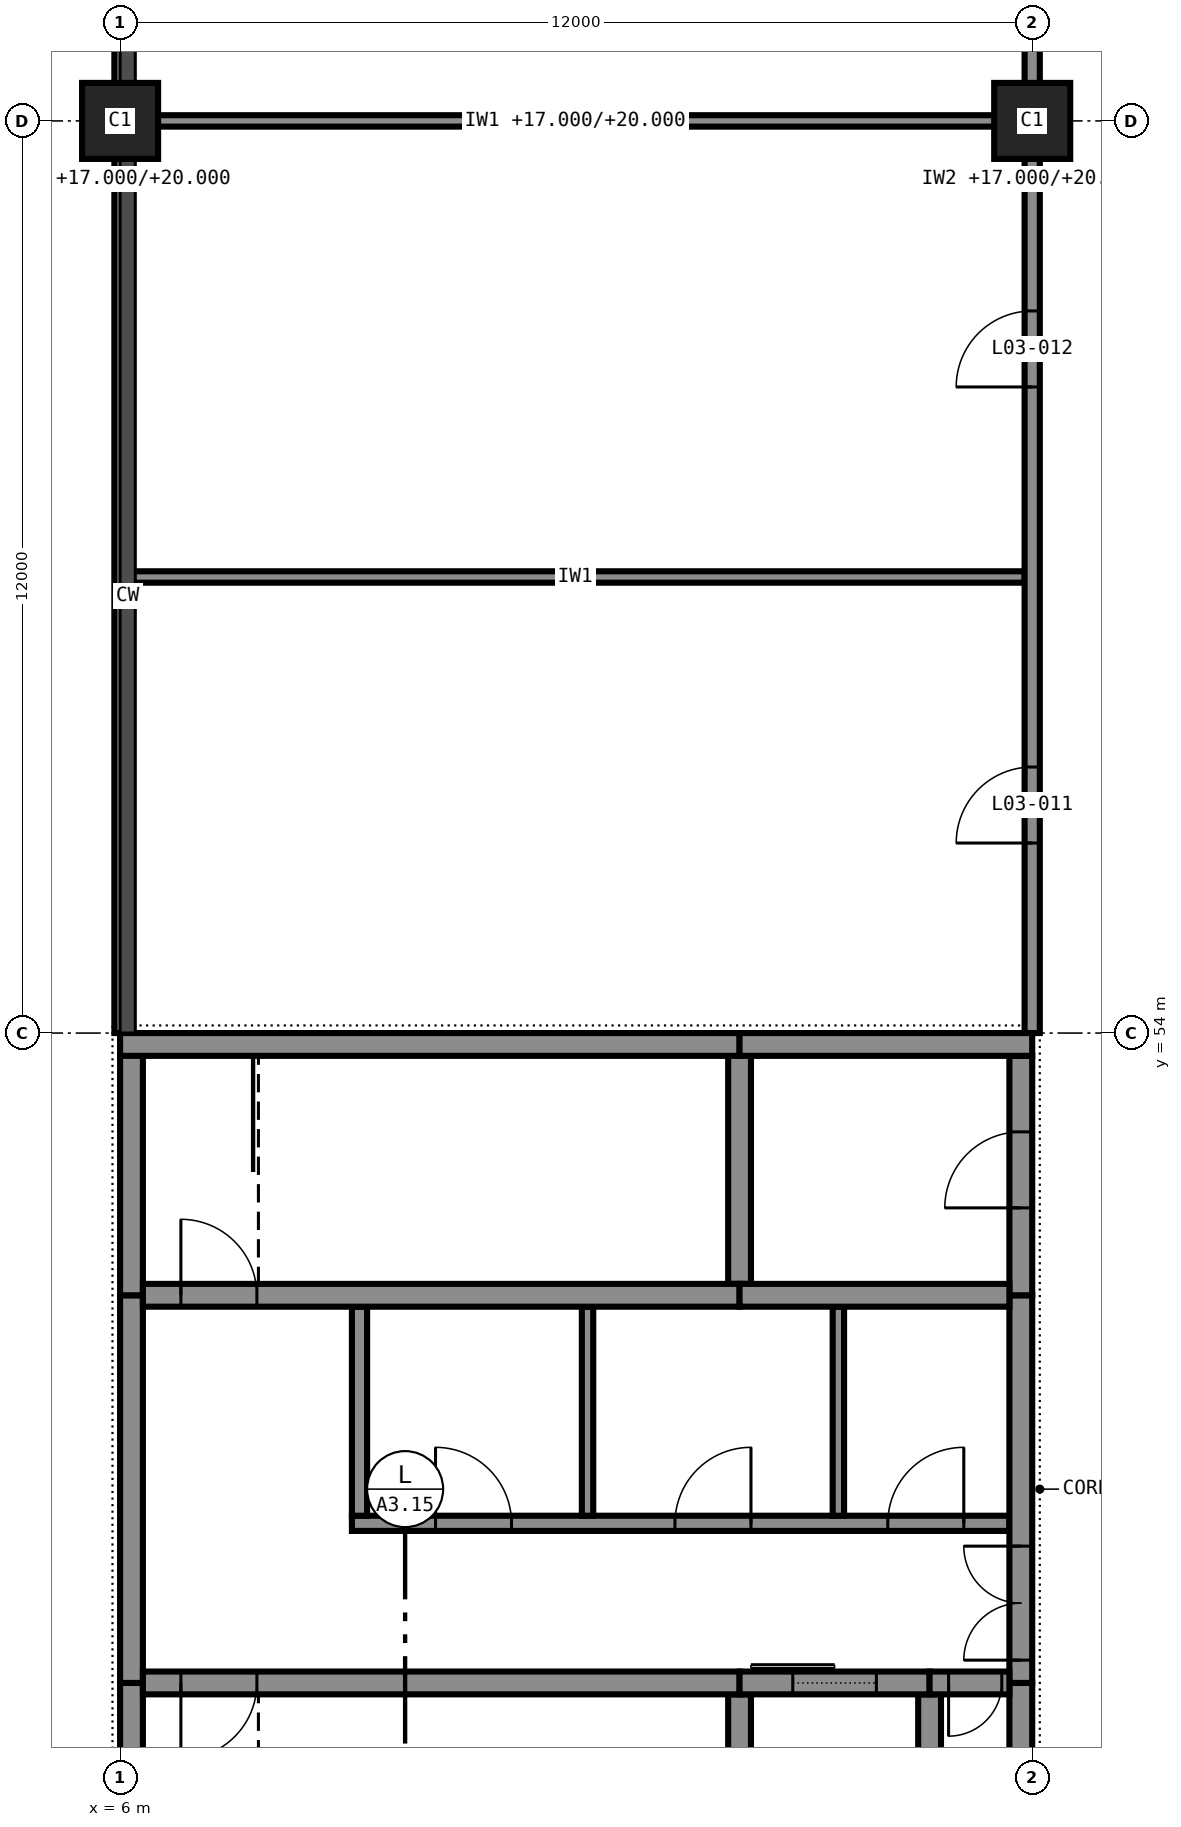
"""IFC4 building model, lengths in metres.
Left out: names, types, materials, properties, quantities, classifications, styles, units other than length and angle.
Written with IfcOpenShell. Run it as: python <this file> out.ifc"""

import sys

from ifc_helpers import new_model, si_unit, direction, frame, frame_2d, origin, origin_2d, place, context, subcontext, project, spatial, rectangle, extrude, element, fill, save


model = new_model("IFC4")
c1 = context("Model", 3, precision=1e-05, world=origin(), true_north=direction((0.0, 1.0)))
c2 = subcontext(c1, "Body", "Model", "MODEL_VIEW")
j1 = project(units=[si_unit("LENGTHUNIT", "METRE"), si_unit("PLANEANGLEUNIT", "RADIAN")], contexts=[c1])
p1 = place(None, origin())
s1 = spatial("IfcSite", under=j1, at=p1, CompositionType="ELEMENT")
p2 = place(p1, origin())
s2 = spatial("IfcBuilding", under=s1, at=p2, CompositionType="ELEMENT")
p3 = place(p2, frame((0.0, 0.0, 17.0)))
s3 = spatial("IfcBuildingStorey", under=s2, at=p3, CompositionType="ELEMENT", Elevation=17.0)
for number, where, z_axis, x_axis in (
    (1, (6.0, 66.0, 0.0), (0.0, 0.0, 1.0), (1.0, 0.0, 0.0)),
    (2, (18.0, 66.0, 0.0), (0.0, 0.0, 1.0), (1.0, 0.0, 0.0)),
):
    element("IfcColumn", number, at=place(p3, frame(where, z_axis=z_axis, x_axis=x_axis)), inside=s3, PredefinedType="COLUMN", context=c2, shape_type="SweptSolid", body=[
        extrude(rectangle(XDim=1.0, YDim=1.0, at=origin_2d()), origin(), (0.0, 0.0, 1.0), 4.0),
    ])
p4 = place(p3, frame((6.0, 53.85, 0.0), z_axis=(0.0, 0.0, 1.0), x_axis=(1.0, 0.0, 0.0)))
e3 = element("IfcWall", 3, at=p4, inside=s3, PredefinedType="SHEAR", context=c2, shape_type="SweptSolid", body=[
    extrude(rectangle(XDim=8.15, YDim=0.3, at=frame_2d((4.075, 0.0))), origin(), (0.0, 0.0, 1.0), 3.8),
])
p5 = place(p3, frame((14.15, 53.85, 0.0), z_axis=(0.0, 0.0, 1.0), x_axis=(1.0, 0.0, 0.0)))
e4 = element("IfcWall", 4, at=p5, inside=s3, PredefinedType="SHEAR", context=c2, shape_type="SweptSolid", body=[
    extrude(rectangle(XDim=3.85, YDim=0.3, at=frame_2d((1.925, 0.0))), origin(), (0.0, 0.0, 1.0), 3.8),
])
p6 = place(p3, frame((6.3, 45.45, 0.0), z_axis=(0.0, 0.0, 1.0), x_axis=(1.0, 0.0, 0.0)))
e5 = element("IfcWall", 5, at=p6, inside=s3, PredefinedType="SHEAR", context=c2, shape_type="SweptSolid", body=[
    extrude(rectangle(XDim=7.85, YDim=0.3, at=frame_2d((3.925, 0.0))), origin(), (0.0, 0.0, 1.0), 3.8),
])
p7 = place(p6, frame((0.5, 0.0, 0.0)))
e6 = element("IfcOpeningElement", 6, at=p7, cuts=e5, PredefinedType="OPENING", context=c2, shape_type="SweptSolid", body=[
    extrude(rectangle(XDim=1.0, YDim=2.1, at=frame_2d((0.5, 1.05))), frame((0.0, 0.16, 0.0), z_axis=(0.0, -1.0, 0.0), x_axis=(1.0, 0.0, 0.0)), (0.0, 0.0, 1.0), 0.32),
])
p8 = place(p3, frame((14.15, 45.45, 0.0), z_axis=(0.0, 0.0, 1.0), x_axis=(1.0, 0.0, 0.0)))
e7 = element("IfcWall", 7, at=p8, inside=s3, PredefinedType="SHEAR", context=c2, shape_type="SweptSolid", body=[
    extrude(rectangle(XDim=2.5, YDim=0.3, at=frame_2d((1.25, 0.0))), origin(), (0.0, 0.0, 1.0), 3.8),
])
p9 = place(p8, frame((0.7, 0.0, 0.0)))
e8 = element("IfcOpeningElement", 8, at=p9, cuts=e7, PredefinedType="OPENING", context=c2, shape_type="SweptSolid", body=[
    extrude(rectangle(XDim=1.1, YDim=2.1, at=frame_2d((0.55, 1.05))), frame((0.0, 0.16, 0.0), z_axis=(0.0, -1.0, 0.0), x_axis=(1.0, 0.0, 0.0)), (0.0, 0.0, 1.0), 0.32),
])
p10 = place(p3, frame((16.65, 45.45, 0.0), z_axis=(0.0, 0.0, 1.0), x_axis=(1.0, 0.0, 0.0)))
e9 = element("IfcWall", 9, at=p10, inside=s3, PredefinedType="SHEAR", context=c2, shape_type="SweptSolid", body=[
    extrude(rectangle(XDim=1.05, YDim=0.3, at=frame_2d((0.525, 0.0))), origin(), (0.0, 0.0, 1.0), 3.8),
])
p11 = place(p10, frame((0.25, 0.0, 0.0)))
e10 = element("IfcOpeningElement", 10, at=p11, cuts=e9, PredefinedType="OPENING", context=c2, shape_type="SweptSolid", body=[
    extrude(rectangle(XDim=0.7, YDim=2.1, at=frame_2d((0.35, 1.05))), frame((0.0, 0.16, 0.0), z_axis=(0.0, -1.0, 0.0), x_axis=(1.0, 0.0, 0.0)), (0.0, 0.0, 1.0), 0.32),
])
p12 = place(p3, frame((6.3, 50.55, 0.0), z_axis=(0.0, 0.0, 1.0), x_axis=(1.0, 0.0, 0.0)))
e11 = element("IfcWall", 11, at=p12, inside=s3, PredefinedType="SHEAR", context=c2, shape_type="SweptSolid", body=[
    extrude(rectangle(XDim=7.85, YDim=0.3, at=frame_2d((3.925, 0.0))), origin(), (0.0, 0.0, 1.0), 3.8),
])
p13 = place(p12, frame((0.5, 0.0, 0.0)))
e12 = element("IfcOpeningElement", 12, at=p13, cuts=e11, PredefinedType="OPENING", context=c2, shape_type="SweptSolid", body=[
    extrude(rectangle(XDim=1.0, YDim=2.1, at=frame_2d((0.5, 1.05))), frame((0.0, 0.16, 0.0), z_axis=(0.0, -1.0, 0.0), x_axis=(1.0, 0.0, 0.0)), (0.0, 0.0, 1.0), 0.32),
])
p14 = place(p3, frame((14.15, 50.55, 0.0), z_axis=(0.0, 0.0, 1.0), x_axis=(1.0, 0.0, 0.0)))
e13 = element("IfcWall", 13, at=p14, inside=s3, PredefinedType="SHEAR", context=c2, shape_type="SweptSolid", body=[
    extrude(rectangle(XDim=3.55, YDim=0.3, at=frame_2d((1.775, 0.0))), origin(), (0.0, 0.0, 1.0), 3.8),
])
p15 = place(p3, frame((6.15, 42.3, 0.0), z_axis=(0.0, 0.0, 1.0), x_axis=(0.0, 1.0, 0.0)))
e14 = element("IfcWall", 14, at=p15, inside=s3, PredefinedType="SHEAR", context=c2, shape_type="SweptSolid", body=[
    extrude(rectangle(XDim=3.15, YDim=0.3, at=frame_2d((1.575, 0.0))), origin(), (0.0, 0.0, 1.0), 3.8),
])
p16 = place(p3, frame((6.15, 45.45, 0.0), z_axis=(0.0, 0.0, 1.0), x_axis=(0.0, 1.0, 0.0)))
e15 = element("IfcWall", 15, at=p16, inside=s3, PredefinedType="SHEAR", context=c2, shape_type="SweptSolid", body=[
    extrude(rectangle(XDim=5.1, YDim=0.3, at=frame_2d((2.55, 0.0))), origin(), (0.0, 0.0, 1.0), 3.8),
])
p17 = place(p3, frame((6.15, 50.55, 0.0), z_axis=(0.0, 0.0, 1.0), x_axis=(0.0, 1.0, 0.0)))
e16 = element("IfcWall", 16, at=p17, inside=s3, PredefinedType="SHEAR", context=c2, shape_type="SweptSolid", body=[
    extrude(rectangle(XDim=3.45, YDim=0.3, at=frame_2d((1.725, 0.0))), origin(), (0.0, 0.0, 1.0), 3.8),
])
p18 = place(p3, frame((17.85, 42.3, 0.0), z_axis=(0.0, 0.0, 1.0), x_axis=(0.0, 1.0, 0.0)))
e17 = element("IfcWall", 17, at=p18, inside=s3, PredefinedType="SHEAR", context=c2, shape_type="SweptSolid", body=[
    extrude(rectangle(XDim=3.15, YDim=0.3, at=frame_2d((1.575, 0.0))), origin(), (0.0, 0.0, 1.0), 3.8),
])
p19 = place(p3, frame((17.85, 45.45, 0.0), z_axis=(0.0, 0.0, 1.0), x_axis=(0.0, 1.0, 0.0)))
e18 = element("IfcWall", 18, at=p19, inside=s3, PredefinedType="SHEAR", context=c2, shape_type="SweptSolid", body=[
    extrude(rectangle(XDim=5.1, YDim=0.3, at=frame_2d((2.55, 0.0))), origin(), (0.0, 0.0, 1.0), 3.8),
])
p20 = place(p19, frame((0.3, 0.0, 0.0)))
e19 = element("IfcOpeningElement", 19, at=p20, cuts=e18, PredefinedType="OPENING", context=c2, shape_type="SweptSolid", body=[
    extrude(rectangle(XDim=1.5, YDim=2.1, at=frame_2d((0.75, 1.05))), frame((0.0, 0.16, 0.0), z_axis=(0.0, -1.0, 0.0), x_axis=(1.0, 0.0, 0.0)), (0.0, 0.0, 1.0), 0.32),
])
p21 = place(p3, frame((17.85, 50.55, 0.0), z_axis=(0.0, 0.0, 1.0), x_axis=(0.0, 1.0, 0.0)))
e20 = element("IfcWall", 20, at=p21, inside=s3, PredefinedType="SHEAR", context=c2, shape_type="SweptSolid", body=[
    extrude(rectangle(XDim=3.15, YDim=0.3, at=frame_2d((1.575, 0.0))), origin(), (0.0, 0.0, 1.0), 3.8),
])
p22 = place(p21, frame((1.15, 0.0, 0.0)))
e21 = element("IfcOpeningElement", 21, at=p22, cuts=e20, PredefinedType="OPENING", context=c2, shape_type="SweptSolid", body=[
    extrude(rectangle(XDim=1.0, YDim=2.1, at=frame_2d((0.5, 1.05))), frame((0.0, 0.16, 0.0), z_axis=(0.0, -1.0, 0.0), x_axis=(1.0, 0.0, 0.0)), (0.0, 0.0, 1.0), 0.32),
])
p23 = place(p3, frame((14.15, 42.3, 0.0), z_axis=(0.0, 0.0, 1.0), x_axis=(0.0, 1.0, 0.0)))
e22 = element("IfcWall", 22, at=p23, inside=s3, PredefinedType="SHEAR", context=c2, shape_type="SweptSolid", body=[
    extrude(rectangle(XDim=3.0, YDim=0.3, at=frame_2d((1.5, 0.0))), origin(), (0.0, 0.0, 1.0), 3.8),
])
p24 = place(p3, frame((14.15, 50.7, 0.0), z_axis=(0.0, 0.0, 1.0), x_axis=(0.0, 1.0, 0.0)))
e23 = element("IfcWall", 23, at=p24, inside=s3, PredefinedType="SHEAR", context=c2, shape_type="SweptSolid", body=[
    extrude(rectangle(XDim=3.3, YDim=0.3, at=frame_2d((1.65, 0.0))), origin(), (0.0, 0.0, 1.0), 3.8),
])
p25 = place(p3, frame((16.65, 42.3, 0.0), z_axis=(0.0, 0.0, 1.0), x_axis=(0.0, 1.0, 0.0)))
e24 = element("IfcWall", 24, at=p25, inside=s3, PredefinedType="SHEAR", context=c2, shape_type="SweptSolid", body=[
    extrude(rectangle(XDim=3.0, YDim=0.3, at=frame_2d((1.5, 0.0))), origin(), (0.0, 0.0, 1.0), 3.8),
])
p26 = place(p3, frame((9.05, 47.55, 0.0), z_axis=(0.0, 0.0, 1.0), x_axis=(1.0, 0.0, 0.0)))
e25 = element("IfcWall", 25, at=p26, inside=s3, PredefinedType="PARTITIONING", context=c2, shape_type="SweptSolid", body=[
    extrude(rectangle(XDim=8.65, YDim=0.2, at=frame_2d((4.325, 0.0))), origin(), (0.0, 0.0, 1.0), 3.8),
])
p27 = place(p26, frame((1.1, 0.0, 0.0)))
e26 = element("IfcOpeningElement", 26, at=p27, cuts=e25, PredefinedType="OPENING", context=c2, shape_type="SweptSolid", body=[
    extrude(rectangle(XDim=1.0, YDim=2.1, at=frame_2d((0.5, 1.05))), frame((0.0, 0.11, 0.0), z_axis=(0.0, -1.0, 0.0), x_axis=(1.0, 0.0, 0.0)), (0.0, 0.0, 1.0), 0.22),
])
p28 = place(p26, frame((4.25, 0.0, 0.0)))
e27 = element("IfcOpeningElement", 27, at=p28, cuts=e25, PredefinedType="OPENING", context=c2, shape_type="SweptSolid", body=[
    extrude(rectangle(XDim=1.0, YDim=2.1, at=frame_2d((0.5, 1.05))), frame((0.0, 0.11, 0.0), z_axis=(0.0, -1.0, 0.0), x_axis=(1.0, 0.0, 0.0)), (0.0, 0.0, 1.0), 0.22),
])
p29 = place(p26, frame((7.05, 0.0, 0.0)))
e28 = element("IfcOpeningElement", 28, at=p29, cuts=e25, PredefinedType="OPENING", context=c2, shape_type="SweptSolid", body=[
    extrude(rectangle(XDim=1.0, YDim=2.1, at=frame_2d((0.5, 1.05))), frame((0.0, 0.11, 0.0), z_axis=(0.0, -1.0, 0.0), x_axis=(1.0, 0.0, 0.0)), (0.0, 0.0, 1.0), 0.22),
])
p30 = place(p3, frame((6.075, 60.0, 0.0), z_axis=(0.0, 0.0, 1.0), x_axis=(1.0, 0.0, 0.0)))
e29 = element("IfcWall", 29, at=p30, inside=s3, PredefinedType="PARTITIONING", context=c2, shape_type="SweptSolid", body=[
    extrude(rectangle(XDim=11.825, YDim=0.15, at=frame_2d((5.913, 0.0))), origin(), (0.0, 0.0, 1.0), 3.8),
])
p31 = place(p3, frame((6.075, 66.0, 0.0), z_axis=(0.0, 0.0, 1.0), x_axis=(1.0, 0.0, 0.0)))
e30 = element("IfcWall", 30, at=p31, inside=s3, PredefinedType="PARTITIONING", context=c2, shape_type="SweptSolid", body=[
    extrude(rectangle(XDim=11.825, YDim=0.15, at=frame_2d((5.913, 0.0))), origin(), (0.0, 0.0, 1.0), 3.0),
])
p32 = place(p3, frame((6.0, 54.0, 0.0), z_axis=(0.0, 0.0, 1.0), x_axis=(0.0, 1.0, 0.0)))
e31 = element("IfcWall", 31, at=p32, inside=s3, PredefinedType="PARTITIONING", context=c2, shape_type="SweptSolid", body=[
    extrude(rectangle(XDim=36.0, YDim=0.15, at=frame_2d((18.0, 0.0))), origin(), (0.0, 0.0, 1.0), 3.0),
])
p33 = place(p3, frame((9.15, 47.65, 0.0), z_axis=(0.0, 0.0, 1.0), x_axis=(0.0, 1.0, 0.0)))
e32 = element("IfcWall", 32, at=p33, inside=s3, PredefinedType="PARTITIONING", context=c2, shape_type="SweptSolid", body=[
    extrude(rectangle(XDim=2.75, YDim=0.2, at=frame_2d((1.375, 0.0))), origin(), (0.0, 0.0, 1.0), 3.8),
])
for number, where, z_axis, x_axis in (
    (33, (12.15, 47.65, 0.0), (0.0, 0.0, 1.0), (0.0, 1.0, 0.0)),
    (34, (15.45, 47.65, 0.0), (0.0, 0.0, 1.0), (0.0, 1.0, 0.0)),
):
    element("IfcWall", number, at=place(p3, frame(where, z_axis=z_axis, x_axis=x_axis)), inside=s3, PredefinedType="PARTITIONING", context=c2, shape_type="SweptSolid", body=[
        extrude(rectangle(XDim=2.75, YDim=0.15, at=frame_2d((1.375, 0.0))), origin(), (0.0, 0.0, 1.0), 3.8),
    ])
p34 = place(p3, frame((18.0, 54.0, 0.0), z_axis=(0.0, 0.0, 1.0), x_axis=(0.0, 1.0, 0.0)))
e35 = element("IfcWall", 35, at=p34, inside=s3, PredefinedType="PARTITIONING", context=c2, shape_type="SweptSolid", body=[
    extrude(rectangle(XDim=36.0, YDim=0.2, at=frame_2d((18.0, 0.0))), origin(), (0.0, 0.0, 1.0), 3.0),
])
p35 = place(p34, frame((2.5, 0.0, 0.0)))
e36 = element("IfcOpeningElement", 36, at=p35, cuts=e35, PredefinedType="OPENING", context=c2, shape_type="SweptSolid", body=[
    extrude(rectangle(XDim=1.0, YDim=2.1, at=frame_2d((0.5, 1.05))), frame((0.0, 0.11, 0.0), z_axis=(0.0, -1.0, 0.0), x_axis=(1.0, 0.0, 0.0)), (0.0, 0.0, 1.0), 0.22),
])
p36 = place(p34, frame((8.5, 0.0, 0.0)))
e37 = element("IfcOpeningElement", 37, at=p36, cuts=e35, PredefinedType="OPENING", context=c2, shape_type="SweptSolid", body=[
    extrude(rectangle(XDim=1.0, YDim=2.1, at=frame_2d((0.5, 1.05))), frame((0.0, 0.11, 0.0), z_axis=(0.0, -1.0, 0.0), x_axis=(1.0, 0.0, 0.0)), (0.0, 0.0, 1.0), 0.22),
])
p37 = place(p34, frame((14.5, 0.0, 0.0)))
e38 = element("IfcOpeningElement", 38, at=p37, cuts=e35, PredefinedType="OPENING", context=c2, shape_type="SweptSolid", body=[
    extrude(rectangle(XDim=1.0, YDim=2.1, at=frame_2d((0.5, 1.05))), frame((0.0, 0.11, 0.0), z_axis=(0.0, -1.0, 0.0), x_axis=(1.0, 0.0, 0.0)), (0.0, 0.0, 1.0), 0.22),
])
p38 = place(p34, frame((20.5, 0.0, 0.0)))
e39 = element("IfcOpeningElement", 39, at=p38, cuts=e35, PredefinedType="OPENING", context=c2, shape_type="SweptSolid", body=[
    extrude(rectangle(XDim=1.0, YDim=2.1, at=frame_2d((0.5, 1.05))), frame((0.0, 0.11, 0.0), z_axis=(0.0, -1.0, 0.0), x_axis=(1.0, 0.0, 0.0)), (0.0, 0.0, 1.0), 0.22),
])
p39 = place(p34, frame((26.5, 0.0, 0.0)))
e40 = element("IfcOpeningElement", 40, at=p39, cuts=e35, PredefinedType="OPENING", context=c2, shape_type="SweptSolid", body=[
    extrude(rectangle(XDim=1.0, YDim=2.1, at=frame_2d((0.5, 1.05))), frame((0.0, 0.11, 0.0), z_axis=(0.0, -1.0, 0.0), x_axis=(1.0, 0.0, 0.0)), (0.0, 0.0, 1.0), 0.22),
])
p40 = place(p34, frame((32.5, 0.0, 0.0)))
e41 = element("IfcOpeningElement", 41, at=p40, cuts=e35, PredefinedType="OPENING", context=c2, shape_type="SweptSolid", body=[
    extrude(rectangle(XDim=1.0, YDim=2.1, at=frame_2d((0.5, 1.05))), frame((0.0, 0.11, 0.0), z_axis=(0.0, -1.0, 0.0), x_axis=(1.0, 0.0, 0.0)), (0.0, 0.0, 1.0), 0.22),
])
p41 = place(p7, frame((1.0, 0.0, 0.0), z_axis=(0.0, 0.0, 1.0), x_axis=(-1.0, 0.0, 0.0)))
e42 = element("IfcDoor", 42, at=p41, inside=s3, OperationType="SINGLE_SWING_LEFT", PredefinedType="DOOR", context=c2, shape_type="SweptSolid", body=[
    extrude(rectangle(XDim=1.0, YDim=2.1, at=frame_2d((0.5, 1.05))), frame((0.0, 0.025, 0.0), z_axis=(0.0, -1.0, 0.0), x_axis=(1.0, 0.0, 0.0)), (0.0, 0.0, 1.0), 0.05),
])
fill(e6, e42)
p42 = place(p9, origin())
e43 = element("IfcDoor", 43, at=p42, inside=s3, OperationType="SLIDING_TO_LEFT", PredefinedType="DOOR", context=c2, shape_type="SweptSolid", body=[
    extrude(rectangle(XDim=1.1, YDim=2.1, at=frame_2d((0.55, 1.05))), frame((0.0, 0.025, 0.0), z_axis=(0.0, -1.0, 0.0), x_axis=(1.0, 0.0, 0.0)), (0.0, 0.0, 1.0), 0.05),
])
fill(e8, e43)
p43 = place(p11, frame((0.7, 0.0, 0.0), z_axis=(0.0, 0.0, 1.0), x_axis=(-1.0, 0.0, 0.0)))
e44 = element("IfcDoor", 44, at=p43, inside=s3, OperationType="SINGLE_SWING_LEFT", PredefinedType="DOOR", context=c2, shape_type="SweptSolid", body=[
    extrude(rectangle(XDim=0.7, YDim=2.1, at=frame_2d((0.35, 1.05))), frame((0.0, 0.025, 0.0), z_axis=(0.0, -1.0, 0.0), x_axis=(1.0, 0.0, 0.0)), (0.0, 0.0, 1.0), 0.05),
])
fill(e10, e44)
p44 = place(p20, origin())
e45 = element("IfcDoor", 45, at=p44, inside=s3, OperationType="DOUBLE_DOOR_SINGLE_SWING", PredefinedType="DOOR", context=c2, shape_type="SweptSolid", body=[
    extrude(rectangle(XDim=1.5, YDim=2.1, at=frame_2d((0.75, 1.05))), frame((0.0, 0.025, 0.0), z_axis=(0.0, -1.0, 0.0), x_axis=(1.0, 0.0, 0.0)), (0.0, 0.0, 1.0), 0.05),
])
fill(e19, e45)
p45 = place(p27, origin())
e46 = element("IfcDoor", 46, at=p45, inside=s3, OperationType="SINGLE_SWING_RIGHT", PredefinedType="DOOR", context=c2, shape_type="SweptSolid", body=[
    extrude(rectangle(XDim=1.0, YDim=2.1, at=frame_2d((0.5, 1.05))), frame((0.0, 0.025, 0.0), z_axis=(0.0, -1.0, 0.0), x_axis=(1.0, 0.0, 0.0)), (0.0, 0.0, 1.0), 0.05),
])
fill(e26, e46)
p46 = place(p28, origin())
e47 = element("IfcDoor", 47, at=p46, inside=s3, OperationType="SINGLE_SWING_LEFT", PredefinedType="DOOR", context=c2, shape_type="SweptSolid", body=[
    extrude(rectangle(XDim=1.0, YDim=2.1, at=frame_2d((0.5, 1.05))), frame((0.0, 0.025, 0.0), z_axis=(0.0, -1.0, 0.0), x_axis=(1.0, 0.0, 0.0)), (0.0, 0.0, 1.0), 0.05),
])
fill(e27, e47)
p47 = place(p29, origin())
e48 = element("IfcDoor", 48, at=p47, inside=s3, OperationType="SINGLE_SWING_LEFT", PredefinedType="DOOR", context=c2, shape_type="SweptSolid", body=[
    extrude(rectangle(XDim=1.0, YDim=2.1, at=frame_2d((0.5, 1.05))), frame((0.0, 0.025, 0.0), z_axis=(0.0, -1.0, 0.0), x_axis=(1.0, 0.0, 0.0)), (0.0, 0.0, 1.0), 0.05),
])
fill(e28, e48)
p48 = place(p13, origin())
e49 = element("IfcDoor", 49, at=p48, inside=s3, OperationType="SINGLE_SWING_RIGHT", PredefinedType="DOOR", context=c2, shape_type="SweptSolid", body=[
    extrude(rectangle(XDim=1.0, YDim=2.1, at=frame_2d((0.5, 1.05))), frame((0.0, 0.025, 0.0), z_axis=(0.0, -1.0, 0.0), x_axis=(1.0, 0.0, 0.0)), (0.0, 0.0, 1.0), 0.05),
])
fill(e12, e49)
p49 = place(p22, origin())
e50 = element("IfcDoor", 50, at=p49, inside=s3, OperationType="SINGLE_SWING_RIGHT", PredefinedType="DOOR", context=c2, shape_type="SweptSolid", body=[
    extrude(rectangle(XDim=1.0, YDim=2.1, at=frame_2d((0.5, 1.05))), frame((0.0, 0.025, 0.0), z_axis=(0.0, -1.0, 0.0), x_axis=(1.0, 0.0, 0.0)), (0.0, 0.0, 1.0), 0.05),
])
fill(e21, e50)
p50 = place(p35, origin())
e51 = element("IfcDoor", 51, at=p50, inside=s3, OperationType="SINGLE_SWING_RIGHT", PredefinedType="DOOR", context=c2, shape_type="SweptSolid", body=[
    extrude(rectangle(XDim=1.0, YDim=2.1, at=frame_2d((0.5, 1.05))), frame((0.0, 0.025, 0.0), z_axis=(0.0, -1.0, 0.0), x_axis=(1.0, 0.0, 0.0)), (0.0, 0.0, 1.0), 0.05),
])
fill(e36, e51)
p51 = place(p36, origin())
e52 = element("IfcDoor", 52, at=p51, inside=s3, OperationType="SINGLE_SWING_RIGHT", PredefinedType="DOOR", context=c2, shape_type="SweptSolid", body=[
    extrude(rectangle(XDim=1.0, YDim=2.1, at=frame_2d((0.5, 1.05))), frame((0.0, 0.025, 0.0), z_axis=(0.0, -1.0, 0.0), x_axis=(1.0, 0.0, 0.0)), (0.0, 0.0, 1.0), 0.05),
])
fill(e37, e52)
save(model, sys.argv[1])
